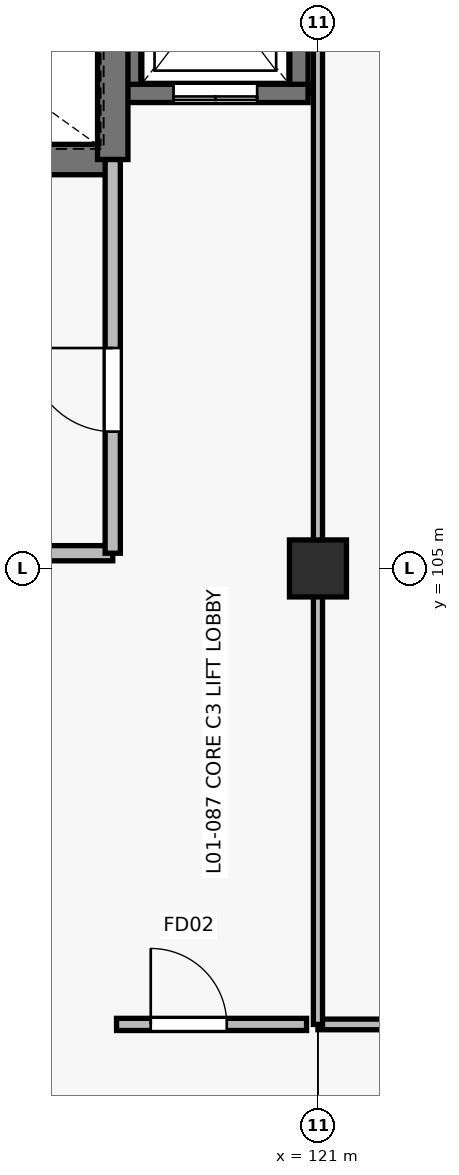
"""IFC4 building model, lengths in metres.
Left out: names, types, materials, properties, quantities, classifications, styles, units other than length and angle.
Written with IfcOpenShell. Run it as: python <this file> out.ifc"""

import sys

from ifc_helpers import new_model, si_unit, direction, frame, frame_2d, origin, origin_2d, place, context, subcontext, project, spatial, rectangle, extrude, element, fill, save


model = new_model("IFC4")
c1 = context("Model", 3, precision=1e-05, world=origin(), true_north=direction((0.0, 1.0)))
c2 = subcontext(c1, "Body", "Model", "MODEL_VIEW")
j1 = project(units=[si_unit("LENGTHUNIT", "METRE"), si_unit("PLANEANGLEUNIT", "RADIAN")], contexts=[c1])
p1 = place(None, origin())
s1 = spatial("IfcSite", under=j1, at=p1, CompositionType="ELEMENT")
p2 = place(p1, origin())
s2 = spatial("IfcBuilding", under=s1, at=p2, CompositionType="ELEMENT")
p3 = place(p2, frame((0.0, 0.0, 4.8)))
s3 = spatial("IfcBuildingStorey", under=s2, at=p3, CompositionType="ELEMENT", Elevation=4.8)
p4 = place(p3, frame((121.0, 105.0, 0.0), z_axis=(0.0, 0.0, 1.0), x_axis=(1.0, 0.0, 0.0)))
e1 = element("IfcColumn", 1, at=p4, inside=s3, PredefinedType="COLUMN", context=c2, shape_type="SweptSolid", body=[
    extrude(rectangle(XDim=0.75, YDim=0.75, at=origin_2d()), origin(), (0.0, 0.0, 1.0), 4.2),
])
for number, where, z_axis, x_axis in (
    (2, (118.55, 111.25, 0.0), (0.0, 0.0, 1.0), (0.0, 1.0, 0.0)),
    (3, (120.75, 113.95, 0.0), (0.0, 0.0, 1.0), (0.0, -1.0, 0.0)),
):
    element("IfcWall", number, at=place(p3, frame(where, z_axis=z_axis, x_axis=x_axis)), inside=s3, PredefinedType="SHEAR", context=c2, shape_type="SweptSolid", body=[
        extrude(rectangle(XDim=2.7, YDim=0.24, at=frame_2d((1.35, 0.0))), origin(), (0.0, 0.0, 1.0), 4.2),
    ])
p5 = place(p3, frame((120.87, 111.25, 0.0), z_axis=(0.0, 0.0, 1.0), x_axis=(-1.0, 0.0, 0.0)))
e4 = element("IfcWall", 4, at=p5, inside=s3, PredefinedType="SHEAR", context=c2, shape_type="SweptSolid", body=[
    extrude(rectangle(XDim=2.44, YDim=0.24, at=frame_2d((1.22, 0.0))), origin(), (0.0, 0.0, 1.0), 4.2),
])
p6 = place(p5, frame((0.67, 0.0, 0.0)))
e5 = element("IfcOpeningElement", 5, at=p6, cuts=e4, PredefinedType="OPENING", context=c2, shape_type="SweptSolid", body=[
    extrude(rectangle(XDim=1.1, YDim=2.15, at=frame_2d((0.55, 1.075))), frame((0.0, 0.13, 0.0), z_axis=(0.0, -1.0, 0.0), x_axis=(1.0, 0.0, 0.0)), (0.0, 0.0, 1.0), 0.26),
])
p7 = place(p3, frame((111.2, 110.38, 0.0), z_axis=(0.0, 0.0, 1.0), x_axis=(1.0, 0.0, 0.0)))
e6 = element("IfcWall", 6, at=p7, inside=s3, PredefinedType="SHEAR", context=c2, shape_type="SweptSolid", body=[
    extrude(rectangle(XDim=7.1, YDim=0.4, at=frame_2d((3.55, 0.0))), origin(), (0.0, 0.0, 1.0), 4.2),
])
p8 = place(p7, frame((0.3, 0.0, 0.0)))
e7 = element("IfcOpeningElement", 7, at=p8, cuts=e6, PredefinedType="OPENING", context=c2, shape_type="SweptSolid", body=[
    extrude(rectangle(XDim=1.0, YDim=2.15, at=frame_2d((0.5, 1.075))), frame((0.0, 0.21, 0.0), z_axis=(0.0, -1.0, 0.0), x_axis=(1.0, 0.0, 0.0)), (0.0, 0.0, 1.0), 0.42),
])
p9 = place(p3, frame((118.3, 110.38, 0.0), z_axis=(0.0, 0.0, 1.0), x_axis=(0.0, 1.0, 0.0)))
e8 = element("IfcWall", 8, at=p9, inside=s3, PredefinedType="SHEAR", context=c2, shape_type="SweptSolid", body=[
    extrude(rectangle(XDim=4.24, YDim=0.4, at=frame_2d((2.12, 0.0))), origin(), (0.0, 0.0, 1.0), 4.2),
])
p10 = place(p3, frame((111.2, 105.2, 0.0), z_axis=(0.0, 0.0, 1.0), x_axis=(1.0, 0.0, 0.0)))
e9 = element("IfcWall", 9, at=p10, inside=s3, PredefinedType="PARTITIONING", context=c2, shape_type="SweptSolid", body=[
    extrude(rectangle(XDim=7.1, YDim=0.2, at=frame_2d((3.55, 0.0))), origin(), (0.0, 0.0, 1.0), 2.925),
])
p11 = place(p10, frame((2.2, 0.0, 0.0)))
e10 = element("IfcOpeningElement", 10, at=p11, cuts=e9, PredefinedType="OPENING", context=c2, shape_type="SweptSolid", body=[
    extrude(rectangle(XDim=1.6, YDim=2.2, at=frame_2d((0.8, 1.1))), frame((0.0, 0.11, 0.0), z_axis=(0.0, -1.0, 0.0), x_axis=(1.0, 0.0, 0.0)), (0.0, 0.0, 1.0), 0.22),
])
p12 = place(p3, frame((118.3, 105.2, 0.0), z_axis=(0.0, 0.0, 1.0), x_axis=(0.0, 1.0, 0.0)))
e11 = element("IfcWall", 11, at=p12, inside=s3, PredefinedType="PARTITIONING", context=c2, shape_type="SweptSolid", body=[
    extrude(rectangle(XDim=5.18, YDim=0.2, at=frame_2d((2.59, 0.0))), origin(), (0.0, 0.0, 1.0), 3.025),
])
p13 = place(p12, frame((1.6, 0.0, 0.0)))
e12 = element("IfcOpeningElement", 12, at=p13, cuts=e11, PredefinedType="OPENING", context=c2, shape_type="SweptSolid", body=[
    extrude(rectangle(XDim=1.1, YDim=2.15, at=frame_2d((0.55, 1.075))), frame((0.0, 0.11, 0.0), z_axis=(0.0, -1.0, 0.0), x_axis=(1.0, 0.0, 0.0)), (0.0, 0.0, 1.0), 0.22),
])
p14 = place(p3, frame((118.35, 99.0, 0.0), z_axis=(0.0, 0.0, 1.0), x_axis=(1.0, 0.0, 0.0)))
e13 = element("IfcWall", 13, at=p14, inside=s3, PredefinedType="PARTITIONING", context=c2, shape_type="SweptSolid", body=[
    extrude(rectangle(XDim=2.5, YDim=0.16, at=frame_2d((1.25, 0.0))), origin(), (0.0, 0.0, 1.0), 2.925),
])
p15 = place(p14, frame((0.45, 0.0, 0.0)))
e14 = element("IfcOpeningElement", 14, at=p15, cuts=e13, PredefinedType="OPENING", context=c2, shape_type="SweptSolid", body=[
    extrude(rectangle(XDim=1.0, YDim=2.15, at=frame_2d((0.5, 1.075))), frame((0.0, 0.09, 0.0), z_axis=(0.0, -1.0, 0.0), x_axis=(1.0, 0.0, 0.0)), (0.0, 0.0, 1.0), 0.18),
])
p16 = place(p3, frame((121.0, 99.0, 0.0), z_axis=(0.0, 0.0, 1.0), x_axis=(1.0, 0.0, 0.0)))
e15 = element("IfcWall", 15, at=p16, inside=s3, PredefinedType="PARTITIONING", context=c2, shape_type="SweptSolid", body=[
    extrude(rectangle(XDim=16.0, YDim=0.14, at=frame_2d((8.0, 0.0))), origin(), (0.0, 0.0, 1.0), 2.925),
])
p17 = place(p16, frame((7.425, 0.0, 0.0)))
e16 = element("IfcOpeningElement", 16, at=p17, cuts=e15, PredefinedType="OPENING", context=c2, shape_type="SweptSolid", body=[
    extrude(rectangle(XDim=1.15, YDim=2.15, at=frame_2d((0.575, 1.075))), frame((0.0, 0.08, 0.0), z_axis=(0.0, -1.0, 0.0), x_axis=(1.0, 0.0, 0.0)), (0.0, 0.0, 1.0), 0.16),
])
p18 = place(p3, frame((121.0, 99.0, 0.0), z_axis=(0.0, 0.0, 1.0), x_axis=(0.0, 1.0, 0.0)))
e17 = element("IfcWall", 17, at=p18, inside=s3, PredefinedType="PARTITIONING", context=c2, shape_type="SweptSolid", body=[
    extrude(rectangle(XDim=15.75, YDim=0.12, at=frame_2d((7.875, 0.0))), origin(), (0.0, 0.0, 1.0), 2.925),
])
p19 = place(p6, origin())
e18 = element("IfcDoor", 18, at=p19, inside=s3, OperationType="DOUBLE_DOOR_SLIDING", PredefinedType="USERDEFINED", context=c2, shape_type="SweptSolid", body=[
    extrude(rectangle(XDim=1.1, YDim=2.15, at=frame_2d((0.55, 1.075))), frame((0.0, 0.025, 0.0), z_axis=(0.0, -1.0, 0.0), x_axis=(1.0, 0.0, 0.0)), (0.0, 0.0, 1.0), 0.05),
])
fill(e5, e18)
p20 = place(p13, origin())
e19 = element("IfcDoor", 19, at=p20, inside=s3, OperationType="SINGLE_SWING_RIGHT", PredefinedType="DOOR", context=c2, shape_type="SweptSolid", body=[
    extrude(rectangle(XDim=1.1, YDim=2.15, at=frame_2d((0.55, 1.075))), frame((0.0, 0.025, 0.0), z_axis=(0.0, -1.0, 0.0), x_axis=(1.0, 0.0, 0.0)), (0.0, 0.0, 1.0), 0.05),
])
fill(e12, e19)
p21 = place(p15, origin())
e20 = element("IfcDoor", 20, at=p21, inside=s3, OperationType="SINGLE_SWING_LEFT", PredefinedType="DOOR", context=c2, shape_type="SweptSolid", body=[
    extrude(rectangle(XDim=1.0, YDim=2.15, at=frame_2d((0.5, 1.075))), frame((0.0, 0.025, 0.0), z_axis=(0.0, -1.0, 0.0), x_axis=(1.0, 0.0, 0.0)), (0.0, 0.0, 1.0), 0.05),
])
fill(e14, e20)
save(model, sys.argv[1])
